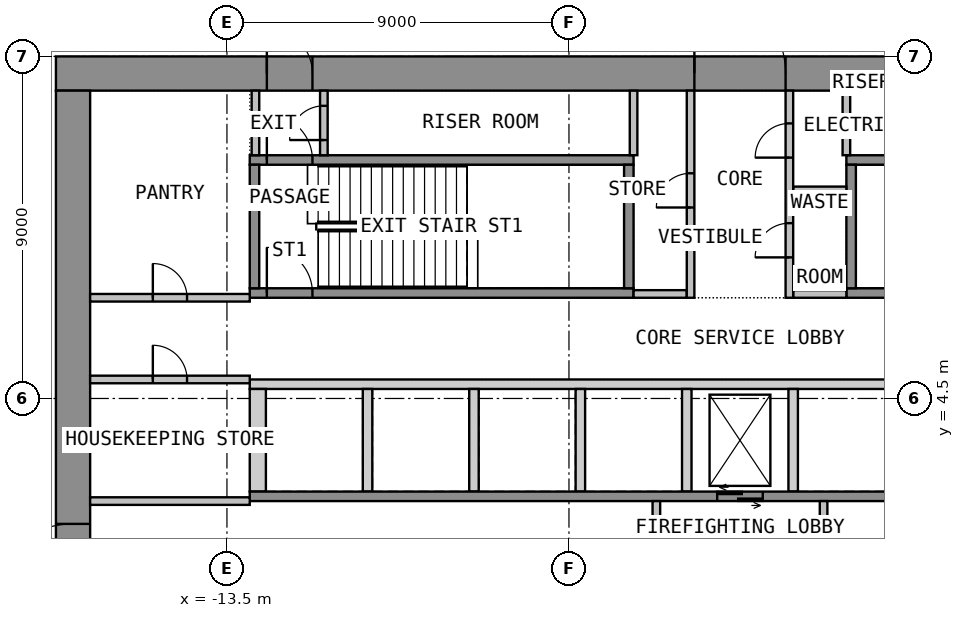
"""IFC4 building model, lengths in metres.
Left out: names, types, materials, properties, quantities, classifications, styles, units other than length and angle.
Written with IfcOpenShell. Run it as: python <this file> out.ifc"""

import sys

from ifc_helpers import new_model, si_unit, direction, frame, frame_2d, origin, place, context, subcontext, project, spatial, polyline, rectangle, outline, extrude, element, fill, save


model = new_model("IFC4")
c1 = context("Model", 3, precision=1e-05, world=origin(), true_north=direction((0.0, 1.0)))
c2 = subcontext(c1, "Body", "Model", "MODEL_VIEW")
j1 = project(units=[si_unit("LENGTHUNIT", "METRE"), si_unit("PLANEANGLEUNIT", "RADIAN")], contexts=[c1])
p1 = place(None, origin())
s1 = spatial("IfcSite", under=j1, at=p1, CompositionType="ELEMENT")
p2 = place(p1, origin())
s2 = spatial("IfcBuilding", under=s1, at=p2, CompositionType="ELEMENT")
p3 = place(p2, frame((0.0, 0.0, -5.0)))
s3 = spatial("IfcBuildingStorey", under=s2, at=p3, CompositionType="ELEMENT", Elevation=-5.0)
p4 = place(p3, frame((-18.0, 13.05, 0.0), z_axis=(0.0, 0.0, 1.0), x_axis=(1.0, 0.0, 0.0)))
e1 = element("IfcWall", 1, at=p4, inside=s3, PredefinedType="SHEAR", context=c2, shape_type="SweptSolid", body=[
    extrude(rectangle(XDim=36.0, YDim=0.9, at=frame_2d((18.0, 0.0))), origin(), (0.0, 0.0, 1.0), 4.55),
])
p5 = place(p4, frame((16.8, 0.0, 0.0)))
e2 = element("IfcOpeningElement", 2, at=p5, cuts=e1, PredefinedType="OPENING", context=c2, shape_type="SweptSolid", body=[
    extrude(rectangle(XDim=2.4, YDim=2.1, at=frame_2d((1.2, 1.05))), frame((0.0, 0.46, 0.0), z_axis=(0.0, -1.0, 0.0), x_axis=(1.0, 0.0, 0.0)), (0.0, 0.0, 1.0), 0.92),
])
p6 = place(p4, frame((5.55, 0.0, 0.0)))
e3 = element("IfcOpeningElement", 3, at=p6, cuts=e1, PredefinedType="OPENING", context=c2, shape_type="SweptSolid", body=[
    extrude(rectangle(XDim=1.2, YDim=2.1, at=frame_2d((0.6, 1.05))), frame((0.0, 0.46, 0.0), z_axis=(0.0, -1.0, 0.0), x_axis=(1.0, 0.0, 0.0)), (0.0, 0.0, 1.0), 0.92),
])
p7 = place(p4, frame((29.25, 0.0, 0.0)))
e4 = element("IfcOpeningElement", 4, at=p7, cuts=e1, PredefinedType="OPENING", context=c2, shape_type="SweptSolid", body=[
    extrude(rectangle(XDim=1.2, YDim=2.1, at=frame_2d((0.6, 1.05))), frame((0.0, 0.46, 0.0), z_axis=(0.0, -1.0, 0.0), x_axis=(1.0, 0.0, 0.0)), (0.0, 0.0, 1.0), 0.92),
])
p8 = place(p3, frame((-17.55, -12.6, 0.0), z_axis=(0.0, 0.0, 1.0), x_axis=(0.0, 1.0, 0.0)))
e5 = element("IfcWall", 5, at=p8, inside=s3, PredefinedType="SHEAR", context=c2, shape_type="SweptSolid", body=[
    extrude(rectangle(XDim=25.2, YDim=0.9, at=frame_2d((12.6, 0.0))), origin(), (0.0, 0.0, 1.0), 4.55),
])
p9 = place(p8, frame((11.4, 0.0, 0.0)))
e6 = element("IfcOpeningElement", 6, at=p9, cuts=e5, PredefinedType="OPENING", context=c2, shape_type="SweptSolid", body=[
    extrude(rectangle(XDim=2.4, YDim=2.1, at=frame_2d((1.2, 1.05))), frame((0.0, 0.46, 0.0), z_axis=(0.0, -1.0, 0.0), x_axis=(1.0, 0.0, 0.0)), (0.0, 0.0, 1.0), 0.92),
])
p10 = place(p3, origin())
e7 = element("IfcWall", 7, at=p10, inside=s3, PredefinedType="SHEAR", context=c2, shape_type="SweptSolid", body=[
    extrude(outline(polyline([(-12.9, 4.75), (12.9, 4.75), (12.9, 5.0), (-12.9, 5.0), (-12.9, 4.75)])), origin(), (0.0, 0.0, 1.0), 4.55),
])
p11 = place(p3, origin())
e8 = element("IfcWall", 8, at=p11, inside=s3, PredefinedType="SHEAR", context=c2, shape_type="SweptSolid", body=[
    extrude(outline(polyline([(-12.9, 2.05), (-12.475, 2.05), (-12.475, 4.75), (-12.9, 4.75), (-12.9, 2.05)])), origin(), (0.0, 0.0, 1.0), 4.55),
])
p12 = place(p3, origin())
e9 = element("IfcWall", 9, at=p12, inside=s3, PredefinedType="SHEAR", context=c2, shape_type="SweptSolid", body=[
    extrude(outline(polyline([(-9.925, 2.05), (-9.675, 2.05), (-9.675, 4.75), (-9.925, 4.75), (-9.925, 2.05)])), origin(), (0.0, 0.0, 1.0), 4.55),
])
p13 = place(p3, origin())
e10 = element("IfcWall", 10, at=p13, inside=s3, PredefinedType="SHEAR", context=c2, shape_type="SweptSolid", body=[
    extrude(outline(polyline([(-7.125, 2.05), (-6.875, 2.05), (-6.875, 4.75), (-7.125, 4.75), (-7.125, 2.05)])), origin(), (0.0, 0.0, 1.0), 4.55),
])
p14 = place(p3, origin())
e11 = element("IfcWall", 11, at=p14, inside=s3, PredefinedType="SHEAR", context=c2, shape_type="SweptSolid", body=[
    extrude(outline(polyline([(-4.325, 2.05), (-4.075, 2.05), (-4.075, 4.75), (-4.325, 4.75), (-4.325, 2.05)])), origin(), (0.0, 0.0, 1.0), 4.55),
])
p15 = place(p3, origin())
e12 = element("IfcWall", 12, at=p15, inside=s3, PredefinedType="SHEAR", context=c2, shape_type="SweptSolid", body=[
    extrude(outline(polyline([(-1.525, 2.05), (-1.275, 2.05), (-1.275, 4.75), (-1.525, 4.75), (-1.525, 2.05)])), origin(), (0.0, 0.0, 1.0), 4.55),
])
p16 = place(p3, origin())
e13 = element("IfcWall", 13, at=p16, inside=s3, PredefinedType="SHEAR", context=c2, shape_type="SweptSolid", body=[
    extrude(outline(polyline([(1.275, 2.05), (1.525, 2.05), (1.525, 4.75), (1.275, 4.75), (1.275, 2.05)])), origin(), (0.0, 0.0, 1.0), 4.55),
])
p17 = place(p3, frame((-12.9, 1.925, 0.0), z_axis=(0.0, 0.0, 1.0), x_axis=(1.0, 0.0, 0.0)))
e14 = element("IfcWall", 14, at=p17, inside=s3, PredefinedType="SHEAR", context=c2, shape_type="SweptSolid", body=[
    extrude(rectangle(XDim=25.8, YDim=0.25, at=frame_2d((12.9, 0.0))), origin(), (0.0, 0.0, 1.0), 4.55),
])
p18 = place(p17, frame((12.3, 0.0, 0.0)))
e15 = element("IfcOpeningElement", 15, at=p18, cuts=e14, PredefinedType="OPENING", context=c2, shape_type="SweptSolid", body=[
    extrude(rectangle(XDim=1.2, YDim=2.1, at=frame_2d((0.6, 1.05))), frame((0.0, 0.135, 0.0), z_axis=(0.0, -1.0, 0.0), x_axis=(1.0, 0.0, 0.0)), (0.0, 0.0, 1.0), 0.27),
])
p19 = place(p17, frame((23.5, 0.0, 0.0)))
e16 = element("IfcOpeningElement", 16, at=p19, cuts=e14, PredefinedType="OPENING", context=c2, shape_type="SweptSolid", body=[
    extrude(rectangle(XDim=1.2, YDim=2.1, at=frame_2d((0.6, 1.05))), frame((0.0, 0.135, 0.0), z_axis=(0.0, -1.0, 0.0), x_axis=(1.0, 0.0, 0.0)), (0.0, 0.0, 1.0), 0.27),
])
p20 = place(p3, frame((-2.2, -1.8, 0.0), z_axis=(0.0, 0.0, 1.0), x_axis=(0.0, 1.0, 0.0)))
e17 = element("IfcWall", 17, at=p20, inside=s3, PredefinedType="PARTITIONING", context=c2, shape_type="SweptSolid", body=[
    extrude(rectangle(XDim=3.6, YDim=0.2, at=frame_2d((1.8, 0.0))), origin(), (0.0, 0.0, 1.0), 4.55),
])
p21 = place(p20, frame((1.2, 0.0, 0.0)))
e18 = element("IfcOpeningElement", 18, at=p21, cuts=e17, PredefinedType="OPENING", context=c2, shape_type="SweptSolid", body=[
    extrude(rectangle(XDim=1.2, YDim=2.1, at=frame_2d((0.6, 1.05))), frame((0.0, 0.11, 0.0), z_axis=(0.0, -1.0, 0.0), x_axis=(1.0, 0.0, 0.0)), (0.0, 0.0, 1.0), 0.22),
])
p22 = place(p3, frame((2.2, -1.8, 0.0), z_axis=(0.0, 0.0, 1.0), x_axis=(0.0, 1.0, 0.0)))
e19 = element("IfcWall", 19, at=p22, inside=s3, PredefinedType="PARTITIONING", context=c2, shape_type="SweptSolid", body=[
    extrude(rectangle(XDim=3.6, YDim=0.2, at=frame_2d((1.8, 0.0))), origin(), (0.0, 0.0, 1.0), 4.55),
])
p23 = place(p22, frame((1.2, 0.0, 0.0)))
e20 = element("IfcOpeningElement", 20, at=p23, cuts=e19, PredefinedType="OPENING", context=c2, shape_type="SweptSolid", body=[
    extrude(rectangle(XDim=1.2, YDim=2.1, at=frame_2d((0.6, 1.05))), frame((0.0, 0.11, 0.0), z_axis=(0.0, -1.0, 0.0), x_axis=(1.0, 0.0, 0.0)), (0.0, 0.0, 1.0), 0.22),
])
p24 = place(p3, frame((-12.9, 7.275, 0.0), z_axis=(0.0, 0.0, 1.0), x_axis=(1.0, 0.0, 0.0)))
e21 = element("IfcWall", 21, at=p24, inside=s3, PredefinedType="SHEAR", context=c2, shape_type="SweptSolid", body=[
    extrude(rectangle(XDim=10.1, YDim=0.25, at=frame_2d((5.05, 0.0))), origin(), (0.0, 0.0, 1.0), 4.55),
])
p25 = place(p24, frame((0.45, 0.0, 0.0)))
e22 = element("IfcOpeningElement", 22, at=p25, cuts=e21, PredefinedType="OPENING", context=c2, shape_type="SweptSolid", body=[
    extrude(rectangle(XDim=1.2, YDim=2.1, at=frame_2d((0.6, 1.05))), frame((0.0, 0.135, 0.0), z_axis=(0.0, -1.0, 0.0), x_axis=(1.0, 0.0, 0.0)), (0.0, 0.0, 1.0), 0.27),
])
p26 = place(p3, frame((-12.9, 10.775, 0.0), z_axis=(0.0, 0.0, 1.0), x_axis=(1.0, 0.0, 0.0)))
e23 = element("IfcWall", 23, at=p26, inside=s3, PredefinedType="SHEAR", context=c2, shape_type="SweptSolid", body=[
    extrude(rectangle(XDim=10.1, YDim=0.25, at=frame_2d((5.05, 0.0))), origin(), (0.0, 0.0, 1.0), 4.55),
])
p27 = place(p26, frame((0.45, 0.0, 0.0)))
e24 = element("IfcOpeningElement", 24, at=p27, cuts=e23, PredefinedType="OPENING", context=c2, shape_type="SweptSolid", body=[
    extrude(rectangle(XDim=1.2, YDim=2.1, at=frame_2d((0.6, 1.05))), frame((0.0, 0.135, 0.0), z_axis=(0.0, -1.0, 0.0), x_axis=(1.0, 0.0, 0.0)), (0.0, 0.0, 1.0), 0.27),
])
for number, where, z_axis, x_axis in (
    (25, (-12.775, 7.4, 0.0), (0.0, 0.0, 1.0), (0.0, 1.0, 0.0)),
    (26, (-2.925, 7.4, 0.0), (0.0, 0.0, 1.0), (0.0, 1.0, 0.0)),
):
    element("IfcWall", number, at=place(p3, frame(where, z_axis=z_axis, x_axis=x_axis)), inside=s3, PredefinedType="SHEAR", context=c2, shape_type="SweptSolid", body=[
        extrude(rectangle(XDim=3.25, YDim=0.25, at=frame_2d((1.625, 0.0))), origin(), (0.0, 0.0, 1.0), 4.55),
    ])
p28 = place(p3, frame((2.8, 7.275, 0.0), z_axis=(0.0, 0.0, 1.0), x_axis=(1.0, 0.0, 0.0)))
e27 = element("IfcWall", 27, at=p28, inside=s3, PredefinedType="SHEAR", context=c2, shape_type="SweptSolid", body=[
    extrude(rectangle(XDim=10.1, YDim=0.25, at=frame_2d((5.05, 0.0))), origin(), (0.0, 0.0, 1.0), 4.55),
])
p29 = place(p28, frame((8.45, 0.0, 0.0)))
e28 = element("IfcOpeningElement", 28, at=p29, cuts=e27, PredefinedType="OPENING", context=c2, shape_type="SweptSolid", body=[
    extrude(rectangle(XDim=1.2, YDim=2.1, at=frame_2d((0.6, 1.05))), frame((0.0, 0.135, 0.0), z_axis=(0.0, -1.0, 0.0), x_axis=(1.0, 0.0, 0.0)), (0.0, 0.0, 1.0), 0.27),
])
p30 = place(p3, frame((2.8, 10.775, 0.0), z_axis=(0.0, 0.0, 1.0), x_axis=(1.0, 0.0, 0.0)))
e29 = element("IfcWall", 29, at=p30, inside=s3, PredefinedType="SHEAR", context=c2, shape_type="SweptSolid", body=[
    extrude(rectangle(XDim=10.1, YDim=0.25, at=frame_2d((5.05, 0.0))), origin(), (0.0, 0.0, 1.0), 4.55),
])
p31 = place(p30, frame((8.45, 0.0, 0.0)))
e30 = element("IfcOpeningElement", 30, at=p31, cuts=e29, PredefinedType="OPENING", context=c2, shape_type="SweptSolid", body=[
    extrude(rectangle(XDim=1.2, YDim=2.1, at=frame_2d((0.6, 1.05))), frame((0.0, 0.135, 0.0), z_axis=(0.0, -1.0, 0.0), x_axis=(1.0, 0.0, 0.0)), (0.0, 0.0, 1.0), 0.27),
])
p32 = place(p3, frame((2.925, 7.4, 0.0), z_axis=(0.0, 0.0, 1.0), x_axis=(0.0, 1.0, 0.0)))
e31 = element("IfcWall", 31, at=p32, inside=s3, PredefinedType="SHEAR", context=c2, shape_type="SweptSolid", body=[
    extrude(rectangle(XDim=3.25, YDim=0.25, at=frame_2d((1.625, 0.0))), origin(), (0.0, 0.0, 1.0), 4.55),
])
for number, where, z_axis, x_axis in (
    (32, (-2.8, 7.25, 0.0), (0.0, 0.0, 1.0), (1.0, 0.0, 0.0)),
    (33, (1.4, 7.25, 0.0), (0.0, 0.0, 1.0), (1.0, 0.0, 0.0)),
    (34, (1.4, 9.975, 0.0), (0.0, 0.0, 1.0), (1.0, 0.0, 0.0)),
):
    element("IfcWall", number, at=place(p3, frame(where, z_axis=z_axis, x_axis=x_axis)), inside=s3, PredefinedType="PARTITIONING", context=c2, shape_type="SweptSolid", body=[
        extrude(rectangle(XDim=1.4, YDim=0.2, at=frame_2d((0.7, 0.0))), origin(), (0.0, 0.0, 1.0), 4.55),
    ])
p33 = place(p3, frame((-1.3, 7.15, 0.0), z_axis=(0.0, 0.0, 1.0), x_axis=(0.0, 1.0, 0.0)))
e35 = element("IfcWall", 35, at=p33, inside=s3, PredefinedType="PARTITIONING", context=c2, shape_type="SweptSolid", body=[
    extrude(rectangle(XDim=5.45, YDim=0.2, at=frame_2d((2.725, 0.0))), origin(), (0.0, 0.0, 1.0), 4.55),
])
p34 = place(p33, frame((2.375, 0.0, 0.0)))
e36 = element("IfcOpeningElement", 36, at=p34, cuts=e35, PredefinedType="OPENING", context=c2, shape_type="SweptSolid", body=[
    extrude(rectangle(XDim=0.9, YDim=2.1, at=frame_2d((0.45, 1.05))), frame((0.0, 0.11, 0.0), z_axis=(0.0, -1.0, 0.0), x_axis=(1.0, 0.0, 0.0)), (0.0, 0.0, 1.0), 0.22),
])
p35 = place(p3, frame((1.3, 7.15, 0.0), z_axis=(0.0, 0.0, 1.0), x_axis=(0.0, 1.0, 0.0)))
e37 = element("IfcWall", 37, at=p35, inside=s3, PredefinedType="PARTITIONING", context=c2, shape_type="SweptSolid", body=[
    extrude(rectangle(XDim=5.45, YDim=0.2, at=frame_2d((2.725, 0.0))), origin(), (0.0, 0.0, 1.0), 4.55),
])
p36 = place(p35, frame((1.062, 0.0, 0.0)))
e38 = element("IfcOpeningElement", 38, at=p36, cuts=e37, PredefinedType="OPENING", context=c2, shape_type="SweptSolid", body=[
    extrude(rectangle(XDim=0.9, YDim=2.1, at=frame_2d((0.45, 1.05))), frame((0.0, 0.11, 0.0), z_axis=(0.0, -1.0, 0.0), x_axis=(1.0, 0.0, 0.0)), (0.0, 0.0, 1.0), 0.22),
])
p37 = place(p35, frame((3.688, 0.0, 0.0)))
e39 = element("IfcOpeningElement", 39, at=p37, cuts=e37, PredefinedType="OPENING", context=c2, shape_type="SweptSolid", body=[
    extrude(rectangle(XDim=0.9, YDim=2.1, at=frame_2d((0.45, 1.05))), frame((0.0, 0.11, 0.0), z_axis=(0.0, -1.0, 0.0), x_axis=(1.0, 0.0, 0.0)), (0.0, 0.0, 1.0), 0.22),
])
p38 = place(p3, frame((-12.75, 10.9, 0.0), z_axis=(0.0, 0.0, 1.0), x_axis=(0.0, 1.0, 0.0)))
e40 = element("IfcWall", 40, at=p38, inside=s3, PredefinedType="PARTITIONING", context=c2, shape_type="SweptSolid", body=[
    extrude(rectangle(XDim=1.7, YDim=0.2, at=frame_2d((0.85, 0.0))), origin(), (0.0, 0.0, 1.0), 4.55),
])
p39 = place(p3, frame((-10.95, 10.9, 0.0), z_axis=(0.0, 0.0, 1.0), x_axis=(0.0, 1.0, 0.0)))
e41 = element("IfcWall", 41, at=p39, inside=s3, PredefinedType="PARTITIONING", context=c2, shape_type="SweptSolid", body=[
    extrude(rectangle(XDim=1.7, YDim=0.2, at=frame_2d((0.85, 0.0))), origin(), (0.0, 0.0, 1.0), 4.55),
])
p40 = place(p39, frame((0.4, 0.0, 0.0)))
e42 = element("IfcOpeningElement", 42, at=p40, cuts=e41, PredefinedType="OPENING", context=c2, shape_type="SweptSolid", body=[
    extrude(rectangle(XDim=0.9, YDim=2.1, at=frame_2d((0.45, 1.05))), frame((0.0, 0.11, 0.0), z_axis=(0.0, -1.0, 0.0), x_axis=(1.0, 0.0, 0.0)), (0.0, 0.0, 1.0), 0.22),
])
p41 = place(p3, frame((-17.1, 7.15, 0.0), z_axis=(0.0, 0.0, 1.0), x_axis=(1.0, 0.0, 0.0)))
e43 = element("IfcWall", 43, at=p41, inside=s3, PredefinedType="PARTITIONING", context=c2, shape_type="SweptSolid", body=[
    extrude(rectangle(XDim=4.2, YDim=0.2, at=frame_2d((2.1, 0.0))), origin(), (0.0, 0.0, 1.0), 4.55),
])
p42 = place(p41, frame((1.65, 0.0, 0.0)))
e44 = element("IfcOpeningElement", 44, at=p42, cuts=e43, PredefinedType="OPENING", context=c2, shape_type="SweptSolid", body=[
    extrude(rectangle(XDim=0.9, YDim=2.1, at=frame_2d((0.45, 1.05))), frame((0.0, 0.11, 0.0), z_axis=(0.0, -1.0, 0.0), x_axis=(1.0, 0.0, 0.0)), (0.0, 0.0, 1.0), 0.22),
])
p43 = place(p3, frame((-17.1, 5.0, 0.0), z_axis=(0.0, 0.0, 1.0), x_axis=(1.0, 0.0, 0.0)))
e45 = element("IfcWall", 45, at=p43, inside=s3, PredefinedType="PARTITIONING", context=c2, shape_type="SweptSolid", body=[
    extrude(rectangle(XDim=4.2, YDim=0.2, at=frame_2d((2.1, 0.0))), origin(), (0.0, 0.0, 1.0), 4.55),
])
p44 = place(p43, frame((1.65, 0.0, 0.0)))
e46 = element("IfcOpeningElement", 46, at=p44, cuts=e45, PredefinedType="OPENING", context=c2, shape_type="SweptSolid", body=[
    extrude(rectangle(XDim=0.9, YDim=2.1, at=frame_2d((0.45, 1.05))), frame((0.0, 0.11, 0.0), z_axis=(0.0, -1.0, 0.0), x_axis=(1.0, 0.0, 0.0)), (0.0, 0.0, 1.0), 0.22),
])
p45 = place(p3, frame((-17.1, 1.8, 0.0), z_axis=(0.0, 0.0, 1.0), x_axis=(1.0, 0.0, 0.0)))
e47 = element("IfcWall", 47, at=p45, inside=s3, PredefinedType="PARTITIONING", context=c2, shape_type="SweptSolid", body=[
    extrude(rectangle(XDim=4.2, YDim=0.2, at=frame_2d((2.1, 0.0))), origin(), (0.0, 0.0, 1.0), 4.55),
])
for number, where, z_axis, x_axis in (
    (48, (-2.8, 10.901, 0.0), (0.0, 0.0, 1.0), (0.0, 1.0, 0.0)),
    (49, (2.8, 10.901, 0.0), (0.0, 0.0, 1.0), (0.0, 1.0, 0.0)),
):
    element("IfcWall", number, at=place(p3, frame(where, z_axis=z_axis, x_axis=x_axis)), inside=s3, PredefinedType="PARTITIONING", context=c2, shape_type="SweptSolid", body=[
        extrude(rectangle(XDim=1.698, YDim=0.2, at=frame_2d((0.849, 0.0))), origin(), (0.0, 0.0, 1.0), 4.55),
    ])
p46 = place(p9, origin())
e50 = element("IfcDoor", 50, at=p46, inside=s3, OperationType="DOUBLE_DOOR_DOUBLE_SWING", PredefinedType="DOOR", context=c2, shape_type="SweptSolid", body=[
    extrude(rectangle(XDim=2.4, YDim=2.1, at=frame_2d((1.2, 1.05))), frame((0.0, 0.025, 0.0), z_axis=(0.0, -1.0, 0.0), x_axis=(1.0, 0.0, 0.0)), (0.0, 0.0, 1.0), 0.05),
])
fill(e6, e50)
p47 = place(p5, origin())
e51 = element("IfcDoor", 51, at=p47, inside=s3, OperationType="DOUBLE_DOOR_DOUBLE_SWING", PredefinedType="DOOR", context=c2, shape_type="SweptSolid", body=[
    extrude(rectangle(XDim=2.4, YDim=2.1, at=frame_2d((1.2, 1.05))), frame((0.0, 0.025, 0.0), z_axis=(0.0, -1.0, 0.0), x_axis=(1.0, 0.0, 0.0)), (0.0, 0.0, 1.0), 0.05),
])
fill(e2, e51)
p48 = place(p6, origin())
e52 = element("IfcDoor", 52, at=p48, inside=s3, OperationType="SINGLE_SWING_RIGHT", PredefinedType="DOOR", context=c2, shape_type="SweptSolid", body=[
    extrude(rectangle(XDim=1.2, YDim=2.1, at=frame_2d((0.6, 1.05))), frame((0.0, 0.025, 0.0), z_axis=(0.0, -1.0, 0.0), x_axis=(1.0, 0.0, 0.0)), (0.0, 0.0, 1.0), 0.05),
])
fill(e3, e52)
p49 = place(p18, origin())
e53 = element("IfcDoor", 53, at=p49, inside=s3, OperationType="DOUBLE_DOOR_SLIDING", PredefinedType="DOOR", context=c2, shape_type="SweptSolid", body=[
    extrude(rectangle(XDim=1.2, YDim=2.1, at=frame_2d((0.6, 1.05))), frame((0.0, 0.025, 0.0), z_axis=(0.0, -1.0, 0.0), x_axis=(1.0, 0.0, 0.0)), (0.0, 0.0, 1.0), 0.05),
])
fill(e15, e53)
p50 = place(p25, origin())
e54 = element("IfcDoor", 54, at=p50, inside=s3, OperationType="SINGLE_SWING_LEFT", PredefinedType="DOOR", context=c2, shape_type="SweptSolid", body=[
    extrude(rectangle(XDim=1.2, YDim=2.1, at=frame_2d((0.6, 1.05))), frame((0.0, 0.025, 0.0), z_axis=(0.0, -1.0, 0.0), x_axis=(1.0, 0.0, 0.0)), (0.0, 0.0, 1.0), 0.05),
])
fill(e22, e54)
p51 = place(p34, origin())
e55 = element("IfcDoor", 55, at=p51, inside=s3, OperationType="SINGLE_SWING_LEFT", PredefinedType="DOOR", context=c2, shape_type="SweptSolid", body=[
    extrude(rectangle(XDim=0.9, YDim=2.1, at=frame_2d((0.45, 1.05))), frame((0.0, 0.025, 0.0), z_axis=(0.0, -1.0, 0.0), x_axis=(1.0, 0.0, 0.0)), (0.0, 0.0, 1.0), 0.05),
])
fill(e36, e55)
p52 = place(p36, origin())
e56 = element("IfcDoor", 56, at=p52, inside=s3, OperationType="SINGLE_SWING_LEFT", PredefinedType="DOOR", context=c2, shape_type="SweptSolid", body=[
    extrude(rectangle(XDim=0.9, YDim=2.1, at=frame_2d((0.45, 1.05))), frame((0.0, 0.025, 0.0), z_axis=(0.0, -1.0, 0.0), x_axis=(1.0, 0.0, 0.0)), (0.0, 0.0, 1.0), 0.05),
])
fill(e38, e56)
p53 = place(p37, origin())
e57 = element("IfcDoor", 57, at=p53, inside=s3, OperationType="SINGLE_SWING_LEFT", PredefinedType="DOOR", context=c2, shape_type="SweptSolid", body=[
    extrude(rectangle(XDim=0.9, YDim=2.1, at=frame_2d((0.45, 1.05))), frame((0.0, 0.025, 0.0), z_axis=(0.0, -1.0, 0.0), x_axis=(1.0, 0.0, 0.0)), (0.0, 0.0, 1.0), 0.05),
])
fill(e39, e57)
p54 = place(p27, origin())
e58 = element("IfcDoor", 58, at=p54, inside=s3, OperationType="SINGLE_SWING_RIGHT", PredefinedType="DOOR", context=c2, shape_type="SweptSolid", body=[
    extrude(rectangle(XDim=1.2, YDim=2.1, at=frame_2d((0.6, 1.05))), frame((0.0, 0.025, 0.0), z_axis=(0.0, -1.0, 0.0), x_axis=(1.0, 0.0, 0.0)), (0.0, 0.0, 1.0), 0.05),
])
fill(e24, e58)
p55 = place(p40, origin())
e59 = element("IfcDoor", 59, at=p55, inside=s3, OperationType="SINGLE_SWING_LEFT", PredefinedType="DOOR", context=c2, shape_type="SweptSolid", body=[
    extrude(rectangle(XDim=0.9, YDim=2.1, at=frame_2d((0.45, 1.05))), frame((0.0, 0.025, 0.0), z_axis=(0.0, -1.0, 0.0), x_axis=(1.0, 0.0, 0.0)), (0.0, 0.0, 1.0), 0.05),
])
fill(e42, e59)
p56 = place(p42, origin())
e60 = element("IfcDoor", 60, at=p56, inside=s3, OperationType="SINGLE_SWING_LEFT", PredefinedType="DOOR", context=c2, shape_type="SweptSolid", body=[
    extrude(rectangle(XDim=0.9, YDim=2.1, at=frame_2d((0.45, 1.05))), frame((0.0, 0.025, 0.0), z_axis=(0.0, -1.0, 0.0), x_axis=(1.0, 0.0, 0.0)), (0.0, 0.0, 1.0), 0.05),
])
fill(e44, e60)
p57 = place(p44, origin())
e61 = element("IfcDoor", 61, at=p57, inside=s3, OperationType="SINGLE_SWING_LEFT", PredefinedType="DOOR", context=c2, shape_type="SweptSolid", body=[
    extrude(rectangle(XDim=0.9, YDim=2.1, at=frame_2d((0.45, 1.05))), frame((0.0, 0.025, 0.0), z_axis=(0.0, -1.0, 0.0), x_axis=(1.0, 0.0, 0.0)), (0.0, 0.0, 1.0), 0.05),
])
fill(e46, e61)
save(model, sys.argv[1])
